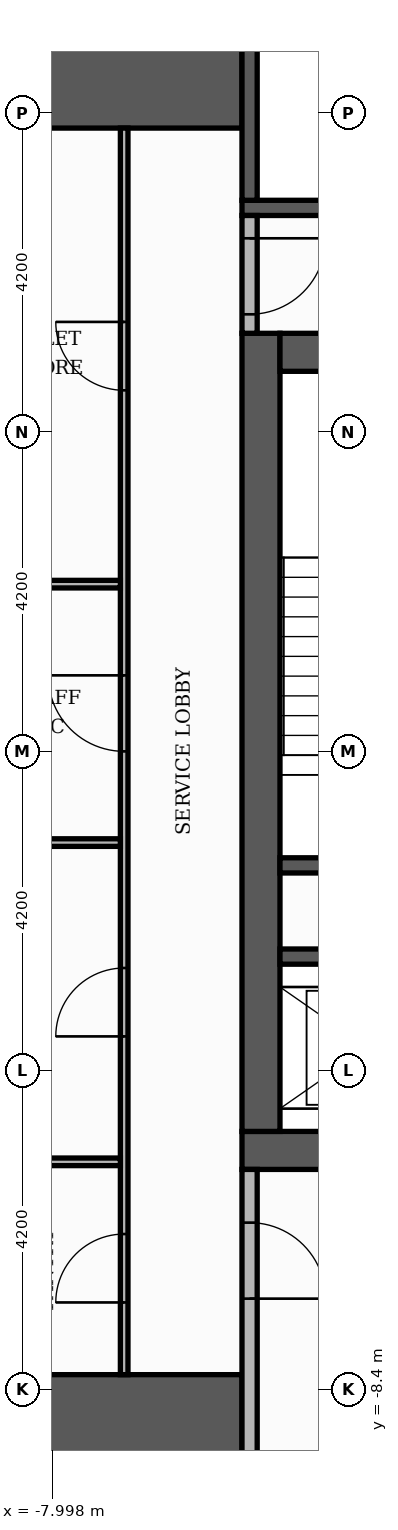
"""IFC4 building model, lengths in metres.
Left out: names, types, materials, properties, quantities, classifications, styles, units other than length and angle.
Written with IfcOpenShell. Run it as: python <this file> out.ifc"""

import sys

from ifc_helpers import new_model, si_unit, direction, frame, frame_2d, origin, place, context, subcontext, project, spatial, rectangle, extrude, element, fill, save


model = new_model("IFC4")
c1 = context("Model", 3, precision=1e-05, world=origin(), true_north=direction((0.0, 1.0)))
c2 = subcontext(c1, "Body", "Model", "MODEL_VIEW")
j1 = project(units=[si_unit("LENGTHUNIT", "METRE"), si_unit("PLANEANGLEUNIT", "RADIAN")], contexts=[c1])
p1 = place(None, origin())
s1 = spatial("IfcSite", under=j1, at=p1, CompositionType="ELEMENT")
p2 = place(p1, origin())
s2 = spatial("IfcBuilding", under=s1, at=p2, CompositionType="ELEMENT")
p3 = place(p2, frame((0.0, 0.0, 141.6)))
s3 = spatial("IfcBuildingStorey", under=s2, at=p3, CompositionType="ELEMENT", Elevation=141.6)
p4 = place(p3, frame((-5.5, -5.25, 0.0), z_axis=(0.0, 0.0, 1.0), x_axis=(1.0, 0.0, 0.0)))
e1 = element("IfcWall", 1, at=p4, inside=s3, PredefinedType="SHEAR", context=c2, shape_type="SweptSolid", body=[
    extrude(rectangle(XDim=11.0, YDim=0.5, at=frame_2d((5.5, 0.0))), origin(), (0.0, 0.0, 1.0), 3.48),
])
p5 = place(p4, frame((4.9, 0.0, 0.0)))
e2 = element("IfcOpeningElement", 2, at=p5, cuts=e1, PredefinedType="OPENING", context=c2, shape_type="SweptSolid", body=[
    extrude(rectangle(XDim=1.2, YDim=2.1, at=frame_2d((0.6, 1.05))), frame((0.0, 0.26, 0.0), z_axis=(0.0, -1.0, 0.0), x_axis=(1.0, 0.0, 0.0)), (0.0, 0.0, 1.0), 0.52),
])
p6 = place(p3, frame((-5.25, -5.0, 0.0), z_axis=(0.0, 0.0, 1.0), x_axis=(0.0, 1.0, 0.0)))
e3 = element("IfcWall", 3, at=p6, inside=s3, PredefinedType="SHEAR", context=c2, shape_type="SweptSolid", body=[
    extrude(rectangle(XDim=10.5, YDim=0.5, at=frame_2d((5.25, 0.0))), origin(), (0.0, 0.0, 1.0), 3.48),
])
p7 = place(p3, frame((-5.0, 5.25, 0.0), z_axis=(0.0, 0.0, 1.0), x_axis=(1.0, 0.0, 0.0)))
e4 = element("IfcWall", 4, at=p7, inside=s3, PredefinedType="SHEAR", context=c2, shape_type="SweptSolid", body=[
    extrude(rectangle(XDim=10.0, YDim=0.5, at=frame_2d((5.0, 0.0))), origin(), (0.0, 0.0, 1.0), 3.48),
])
p8 = place(p7, frame((4.4, 0.0, 0.0)))
e5 = element("IfcOpeningElement", 5, at=p8, cuts=e4, PredefinedType="OPENING", context=c2, shape_type="SweptSolid", body=[
    extrude(rectangle(XDim=1.2, YDim=2.1, at=frame_2d((0.6, 1.05))), frame((0.0, 0.26, 0.0), z_axis=(0.0, -1.0, 0.0), x_axis=(1.0, 0.0, 0.0)), (0.0, 0.0, 1.0), 0.52),
])
for number, where, z_axis, x_axis in (
    (6, (-10.1, -9.15, 0.0), (0.0, 0.0, 1.0), (1.0, 0.0, 0.0)),
    (7, (-10.1, 9.15, 0.0), (0.0, 0.0, 1.0), (1.0, 0.0, 0.0)),
):
    element("IfcWall", number, at=place(p3, frame(where, z_axis=z_axis, x_axis=x_axis)), inside=s3, PredefinedType="SHEAR", context=c2, shape_type="SweptSolid", body=[
        extrude(rectangle(XDim=4.6, YDim=1.9, at=frame_2d((2.3, 0.0))), origin(), (0.0, 0.0, 1.0), 3.48),
    ])
p9 = place(p3, frame((-5.0, -1.5, 0.0), z_axis=(0.0, 0.0, 1.0), x_axis=(1.0, 0.0, 0.0)))
e8 = element("IfcWall", 8, at=p9, inside=s3, PredefinedType="SHEAR", context=c2, shape_type="SweptSolid", body=[
    extrude(rectangle(XDim=3.05, YDim=0.2, at=frame_2d((1.525, 0.0))), origin(), (0.0, 0.0, 1.0), 3.48),
])
p10 = place(p3, frame((-5.5, 7.15, 0.0), z_axis=(0.0, 0.0, 1.0), x_axis=(1.0, 0.0, 0.0)))
e9 = element("IfcWall", 9, at=p10, inside=s3, PredefinedType="SHEAR", context=c2, shape_type="SweptSolid", body=[
    extrude(rectangle(XDim=6.8, YDim=0.2, at=frame_2d((3.4, 0.0))), origin(), (0.0, 0.0, 1.0), 3.48),
])
for number, where, z_axis, x_axis in (
    (10, (-5.4, 7.25, 0.0), (0.0, 0.0, 1.0), (0.0, 1.0, 0.0)),
    (11, (-5.0, -2.7, 0.0), (0.0, 0.0, 1.0), (1.0, 0.0, 0.0)),
):
    element("IfcWall", number, at=place(p3, frame(where, z_axis=z_axis, x_axis=x_axis)), inside=s3, PredefinedType="SHEAR", context=c2, shape_type="SweptSolid", body=[
        extrude(rectangle(XDim=2.85, YDim=0.2, at=frame_2d((1.425, 0.0))), origin(), (0.0, 0.0, 1.0), 3.48),
    ])
p11 = place(p3, frame((-5.4, -10.1, 0.0), z_axis=(0.0, 0.0, 1.0), x_axis=(0.0, 1.0, 0.0)))
e12 = element("IfcWall", 12, at=p11, inside=s3, PredefinedType="PARTITIONING", context=c2, shape_type="SweptSolid", body=[
    extrude(rectangle(XDim=4.6, YDim=0.2, at=frame_2d((2.3, 0.0))), origin(), (0.0, 0.0, 1.0), 3.48),
])
p12 = place(p11, frame((2.9, 0.0, 0.0)))
e13 = element("IfcOpeningElement", 13, at=p12, cuts=e12, PredefinedType="OPENING", context=c2, shape_type="SweptSolid", body=[
    extrude(rectangle(XDim=1.0, YDim=2.1, at=frame_2d((0.5, 1.05))), frame((0.0, 0.11, 0.0), z_axis=(0.0, -1.0, 0.0), x_axis=(1.0, 0.0, 0.0)), (0.0, 0.0, 1.0), 0.22),
])
p13 = place(p3, frame((-7.05, -8.2, 0.0), z_axis=(0.0, 0.0, 1.0), x_axis=(0.0, 1.0, 0.0)))
e14 = element("IfcWall", 14, at=p13, inside=s3, PredefinedType="PARTITIONING", context=c2, shape_type="SweptSolid", body=[
    extrude(rectangle(XDim=16.4, YDim=0.1, at=frame_2d((8.2, 0.0))), origin(), (0.0, 0.0, 1.0), 3.48),
])
p14 = place(p13, frame((0.95, 0.0, 0.0)))
e15 = element("IfcOpeningElement", 15, at=p14, cuts=e14, PredefinedType="OPENING", context=c2, shape_type="SweptSolid", body=[
    extrude(rectangle(XDim=0.9, YDim=2.1, at=frame_2d((0.45, 1.05))), frame((0.0, 0.06, 0.0), z_axis=(0.0, -1.0, 0.0), x_axis=(1.0, 0.0, 0.0)), (0.0, 0.0, 1.0), 0.12),
])
p15 = place(p13, frame((4.45, 0.0, 0.0)))
e16 = element("IfcOpeningElement", 16, at=p15, cuts=e14, PredefinedType="OPENING", context=c2, shape_type="SweptSolid", body=[
    extrude(rectangle(XDim=0.9, YDim=2.1, at=frame_2d((0.45, 1.05))), frame((0.0, 0.06, 0.0), z_axis=(0.0, -1.0, 0.0), x_axis=(1.0, 0.0, 0.0)), (0.0, 0.0, 1.0), 0.12),
])
p16 = place(p13, frame((8.2, 0.0, 0.0)))
e17 = element("IfcOpeningElement", 17, at=p16, cuts=e14, PredefinedType="OPENING", context=c2, shape_type="SweptSolid", body=[
    extrude(rectangle(XDim=1.0, YDim=2.1, at=frame_2d((0.5, 1.05))), frame((0.0, 0.06, 0.0), z_axis=(0.0, -1.0, 0.0), x_axis=(1.0, 0.0, 0.0)), (0.0, 0.0, 1.0), 0.12),
])
p17 = place(p13, frame((12.95, 0.0, 0.0)))
e18 = element("IfcOpeningElement", 18, at=p17, cuts=e14, PredefinedType="OPENING", context=c2, shape_type="SweptSolid", body=[
    extrude(rectangle(XDim=0.9, YDim=2.1, at=frame_2d((0.45, 1.05))), frame((0.0, 0.06, 0.0), z_axis=(0.0, -1.0, 0.0), x_axis=(1.0, 0.0, 0.0)), (0.0, 0.0, 1.0), 0.12),
])
for number, where, z_axis, x_axis in (
    (19, (-9.0, -5.4, 0.0), (0.0, 0.0, 1.0), (1.0, 0.0, 0.0)),
    (20, (-9.0, -1.2, 0.0), (0.0, 0.0, 1.0), (1.0, 0.0, 0.0)),
    (21, (-9.0, 2.2, 0.0), (0.0, 0.0, 1.0), (1.0, 0.0, 0.0)),
):
    element("IfcWall", number, at=place(p3, frame(where, z_axis=z_axis, x_axis=x_axis)), inside=s3, PredefinedType="PARTITIONING", context=c2, shape_type="SweptSolid", body=[
        extrude(rectangle(XDim=1.9, YDim=0.1, at=frame_2d((0.95, 0.0))), origin(), (0.0, 0.0, 1.0), 3.48),
    ])
p18 = place(p3, frame((-5.4, 5.5, 0.0), z_axis=(0.0, 0.0, 1.0), x_axis=(0.0, 1.0, 0.0)))
e22 = element("IfcWall", 22, at=p18, inside=s3, PredefinedType="PARTITIONING", context=c2, shape_type="SweptSolid", body=[
    extrude(rectangle(XDim=1.55, YDim=0.2, at=frame_2d((0.775, 0.0))), origin(), (0.0, 0.0, 1.0), 3.48),
])
p19 = place(p18, frame((0.25, 0.0, 0.0)))
e23 = element("IfcOpeningElement", 23, at=p19, cuts=e22, PredefinedType="OPENING", context=c2, shape_type="SweptSolid", body=[
    extrude(rectangle(XDim=1.0, YDim=2.1, at=frame_2d((0.5, 1.05))), frame((0.0, 0.11, 0.0), z_axis=(0.0, -1.0, 0.0), x_axis=(1.0, 0.0, 0.0)), (0.0, 0.0, 1.0), 0.22),
])
p20 = place(p19, frame((1.0, 0.0, 0.0), z_axis=(0.0, 0.0, 1.0), x_axis=(-1.0, 0.0, 0.0)))
e24 = element("IfcDoor", 24, at=p20, inside=s3, OperationType="SINGLE_SWING_RIGHT", PredefinedType="DOOR", context=c2, shape_type="SweptSolid", body=[
    extrude(rectangle(XDim=1.0, YDim=2.1, at=frame_2d((0.5, 1.05))), frame((0.0, 0.025, 0.0), z_axis=(0.0, -1.0, 0.0), x_axis=(1.0, 0.0, 0.0)), (0.0, 0.0, 1.0), 0.05),
])
fill(e23, e24)
p21 = place(p12, frame((1.0, 0.0, 0.0), z_axis=(0.0, 0.0, 1.0), x_axis=(-1.0, 0.0, 0.0)))
e25 = element("IfcDoor", 25, at=p21, inside=s3, OperationType="SINGLE_SWING_LEFT", PredefinedType="DOOR", context=c2, shape_type="SweptSolid", body=[
    extrude(rectangle(XDim=1.0, YDim=2.1, at=frame_2d((0.5, 1.05))), frame((0.0, 0.025, 0.0), z_axis=(0.0, -1.0, 0.0), x_axis=(1.0, 0.0, 0.0)), (0.0, 0.0, 1.0), 0.05),
])
fill(e13, e25)
p22 = place(p14, origin())
e26 = element("IfcDoor", 26, at=p22, inside=s3, OperationType="SINGLE_SWING_LEFT", PredefinedType="DOOR", context=c2, shape_type="SweptSolid", body=[
    extrude(rectangle(XDim=0.9, YDim=2.1, at=frame_2d((0.45, 1.05))), frame((0.0, 0.025, 0.0), z_axis=(0.0, -1.0, 0.0), x_axis=(1.0, 0.0, 0.0)), (0.0, 0.0, 1.0), 0.05),
])
fill(e15, e26)
p23 = place(p15, origin())
e27 = element("IfcDoor", 27, at=p23, inside=s3, OperationType="SINGLE_SWING_LEFT", PredefinedType="DOOR", context=c2, shape_type="SweptSolid", body=[
    extrude(rectangle(XDim=0.9, YDim=2.1, at=frame_2d((0.45, 1.05))), frame((0.0, 0.025, 0.0), z_axis=(0.0, -1.0, 0.0), x_axis=(1.0, 0.0, 0.0)), (0.0, 0.0, 1.0), 0.05),
])
fill(e16, e27)
p24 = place(p16, origin())
e28 = element("IfcDoor", 28, at=p24, inside=s3, OperationType="SINGLE_SWING_RIGHT", PredefinedType="DOOR", context=c2, shape_type="SweptSolid", body=[
    extrude(rectangle(XDim=1.0, YDim=2.1, at=frame_2d((0.5, 1.05))), frame((0.0, 0.025, 0.0), z_axis=(0.0, -1.0, 0.0), x_axis=(1.0, 0.0, 0.0)), (0.0, 0.0, 1.0), 0.05),
])
fill(e17, e28)
p25 = place(p17, origin())
e29 = element("IfcDoor", 29, at=p25, inside=s3, OperationType="SINGLE_SWING_RIGHT", PredefinedType="DOOR", context=c2, shape_type="SweptSolid", body=[
    extrude(rectangle(XDim=0.9, YDim=2.1, at=frame_2d((0.45, 1.05))), frame((0.0, 0.025, 0.0), z_axis=(0.0, -1.0, 0.0), x_axis=(1.0, 0.0, 0.0)), (0.0, 0.0, 1.0), 0.05),
])
fill(e18, e29)
save(model, sys.argv[1])
